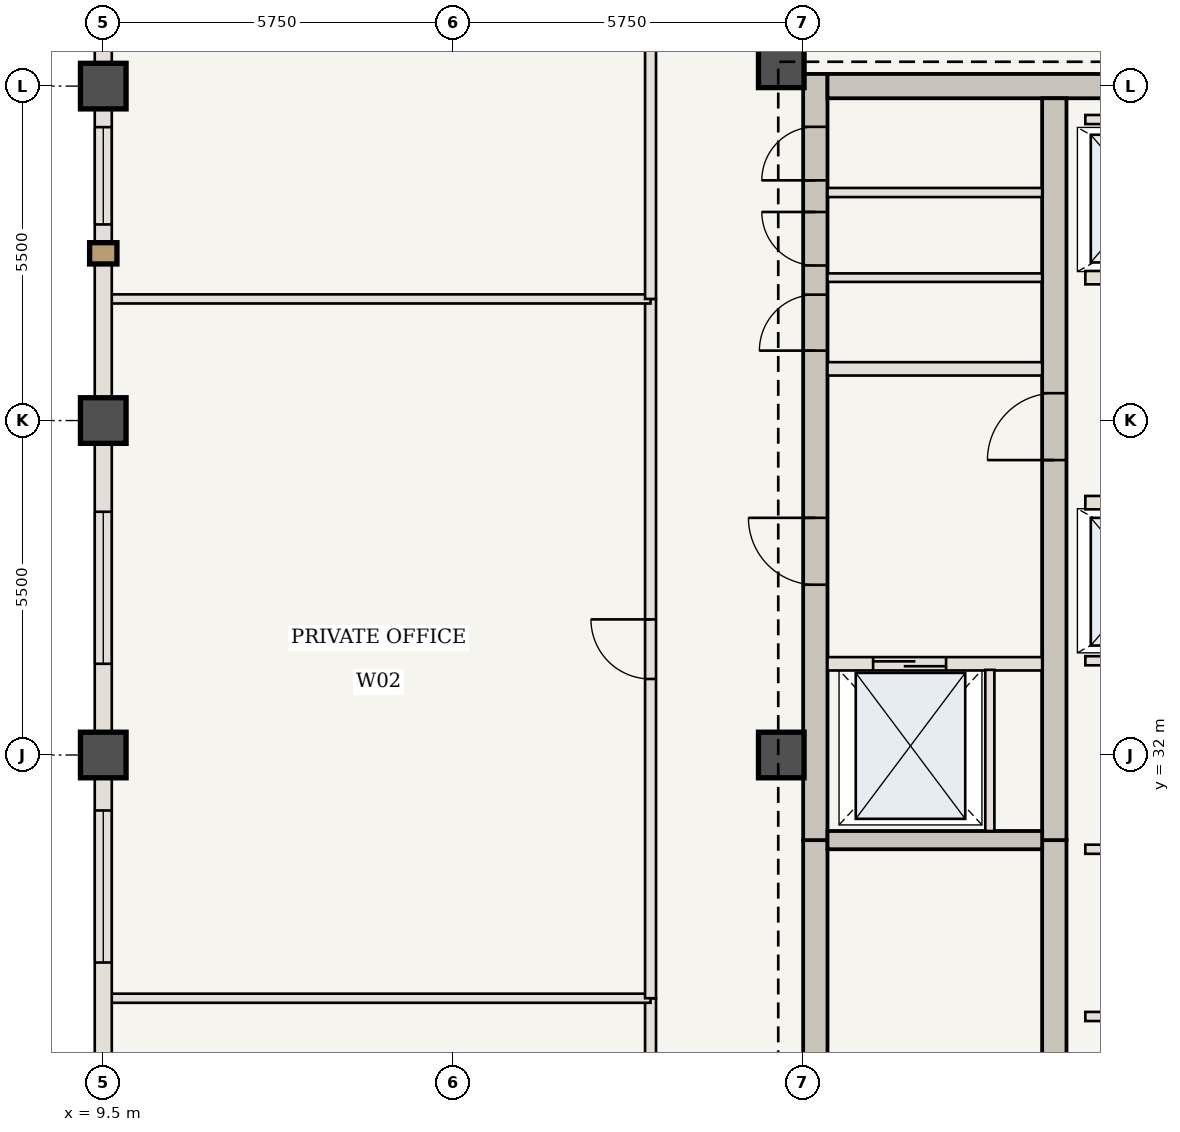
"""IFC4 building model, lengths in metres.
Left out: names, types, materials, properties, quantities, classifications, styles, units other than length and angle.
Written with IfcOpenShell. Run it as: python <this file> out.ifc"""

import sys

from ifc_helpers import new_model, si_unit, direction, frame, frame_2d, origin, origin_2d, place, context, subcontext, project, spatial, rectangle, extrude, element, fill, save


model = new_model("IFC4")
c1 = context("Model", 3, precision=1e-05, world=origin(), true_north=direction((0.0, 1.0)))
c2 = subcontext(c1, "Body", "Model", "MODEL_VIEW")
j1 = project(units=[si_unit("LENGTHUNIT", "METRE"), si_unit("PLANEANGLEUNIT", "RADIAN")], contexts=[c1])
p1 = place(None, origin())
s1 = spatial("IfcSite", under=j1, at=p1, CompositionType="ELEMENT")
p2 = place(p1, origin())
s2 = spatial("IfcBuilding", under=s1, at=p2, CompositionType="ELEMENT")
p3 = place(p2, frame((0.0, 0.0, 273.7)))
s3 = spatial("IfcBuildingStorey", under=s2, at=p3, CompositionType="ELEMENT", Elevation=273.7)
p4 = place(p3, frame((21.21, 20.75, 0.0), z_axis=(0.0, 0.0, 1.0), x_axis=(0.0, 1.0, 0.0)))
e1 = element("IfcWall", 1, at=p4, inside=s3, PredefinedType="SHEAR", context=c2, shape_type="SweptSolid", body=[
    extrude(rectangle(XDim=9.85, YDim=0.4, at=frame_2d((4.925, 0.0))), origin(), (0.0, 0.0, 1.0), 3.85),
])
p5 = place(p4, frame((1.0, 0.0, 0.0)))
e2 = element("IfcOpeningElement", 2, at=p5, cuts=e1, PredefinedType="OPENING", context=c2, shape_type="SweptSolid", body=[
    extrude(rectangle(XDim=1.15, YDim=2.15, at=frame_2d((0.575, 1.075))), frame((0.0, 0.21, 0.0), z_axis=(0.0, -1.0, 0.0), x_axis=(1.0, 0.0, 0.0)), (0.0, 0.0, 1.0), 0.42),
])
p6 = place(p3, frame((21.21, 30.6, 0.0), z_axis=(0.0, 0.0, 1.0), x_axis=(0.0, 1.0, 0.0)))
e3 = element("IfcWall", 3, at=p6, inside=s3, PredefinedType="SHEAR", context=c2, shape_type="SweptSolid", body=[
    extrude(rectangle(XDim=12.6, YDim=0.4, at=frame_2d((6.3, 0.0))), origin(), (0.0, 0.0, 1.0), 3.85),
])
p7 = place(p6, frame((4.2, 0.0, 0.0)))
e4 = element("IfcOpeningElement", 4, at=p7, cuts=e3, PredefinedType="OPENING", context=c2, shape_type="SweptSolid", body=[
    extrude(rectangle(XDim=1.1, YDim=2.15, at=frame_2d((0.55, 1.075))), frame((0.0, 0.21, 0.0), z_axis=(0.0, -1.0, 0.0), x_axis=(1.0, 0.0, 0.0)), (0.0, 0.0, 1.0), 0.42),
])
p8 = place(p6, frame((8.05, 0.0, 0.0)))
e5 = element("IfcOpeningElement", 5, at=p8, cuts=e3, PredefinedType="OPENING", context=c2, shape_type="SweptSolid", body=[
    extrude(rectangle(XDim=0.92, YDim=2.1, at=frame_2d((0.46, 1.05))), frame((0.0, 0.21, 0.0), z_axis=(0.0, -1.0, 0.0), x_axis=(1.0, 0.0, 0.0)), (0.0, 0.0, 1.0), 0.42),
])
p9 = place(p6, frame((9.45, 0.0, 0.0)))
e6 = element("IfcOpeningElement", 6, at=p9, cuts=e3, PredefinedType="OPENING", context=c2, shape_type="SweptSolid", body=[
    extrude(rectangle(XDim=0.88, YDim=2.1, at=frame_2d((0.44, 1.05))), frame((0.0, 0.21, 0.0), z_axis=(0.0, -1.0, 0.0), x_axis=(1.0, 0.0, 0.0)), (0.0, 0.0, 1.0), 0.42),
])
p10 = place(p6, frame((10.85, 0.0, 0.0)))
e7 = element("IfcOpeningElement", 7, at=p10, cuts=e3, PredefinedType="OPENING", context=c2, shape_type="SweptSolid", body=[
    extrude(rectangle(XDim=0.88, YDim=2.1, at=frame_2d((0.44, 1.05))), frame((0.0, 0.21, 0.0), z_axis=(0.0, -1.0, 0.0), x_axis=(1.0, 0.0, 0.0)), (0.0, 0.0, 1.0), 0.42),
])
p11 = place(p3, frame((21.41, 43.0, 0.0), z_axis=(0.0, 0.0, 1.0), x_axis=(1.0, 0.0, 0.0)))
e8 = element("IfcWall", 8, at=p11, inside=s3, PredefinedType="SHEAR", context=c2, shape_type="SweptSolid", body=[
    extrude(rectangle(XDim=12.79, YDim=0.4, at=frame_2d((6.395, 0.0))), origin(), (0.0, 0.0, 1.0), 3.85),
])
p12 = place(p3, frame((25.14, 21.15, 0.0), z_axis=(0.0, 0.0, 1.0), x_axis=(0.0, 1.0, 0.0)))
e9 = element("IfcWall", 9, at=p12, inside=s3, PredefinedType="SHEAR", context=c2, shape_type="SweptSolid", body=[
    extrude(rectangle(XDim=9.45, YDim=0.4, at=frame_2d((4.725, 0.0))), origin(), (0.0, 0.0, 1.0), 3.85),
])
p13 = place(p3, frame((25.14, 30.6, 0.0), z_axis=(0.0, 0.0, 1.0), x_axis=(0.0, 1.0, 0.0)))
e10 = element("IfcWall", 10, at=p13, inside=s3, PredefinedType="SHEAR", context=c2, shape_type="SweptSolid", body=[
    extrude(rectangle(XDim=12.2, YDim=0.4, at=frame_2d((6.1, 0.0))), origin(), (0.0, 0.0, 1.0), 3.85),
])
p14 = place(p13, frame((6.25, 0.0, 0.0)))
e11 = element("IfcOpeningElement", 11, at=p14, cuts=e10, PredefinedType="OPENING", context=c2, shape_type="SweptSolid", body=[
    extrude(rectangle(XDim=1.1, YDim=2.15, at=frame_2d((0.55, 1.075))), frame((0.0, 0.21, 0.0), z_axis=(0.0, -1.0, 0.0), x_axis=(1.0, 0.0, 0.0)), (0.0, 0.0, 1.0), 0.42),
])
for number, where, z_axis, x_axis in (
    (12, (20.65, 43.35, 0.0), (0.0, 0.0, 1.0), (1.0, 0.0, 0.0)),
    (13, (20.65, 32.0, 0.0), (0.0, 0.0, 1.0), (1.0, 0.0, 0.0)),
    (14, (9.5, 32.0, 0.0), (0.0, 0.0, 1.0), (1.0, 0.0, 0.0)),
    (15, (9.5, 37.5, 0.0), (0.0, 0.0, 1.0), (1.0, 0.0, 0.0)),
    (16, (9.5, 43.0, 0.0), (0.0, 0.0, 1.0), (1.0, 0.0, 0.0)),
):
    element("IfcColumn", number, at=place(p3, frame(where, z_axis=z_axis, x_axis=x_axis)), inside=s3, PredefinedType="COLUMN", context=c2, shape_type="SweptSolid", body=[
        extrude(rectangle(XDim=0.75, YDim=0.75, at=origin_2d()), origin(), (0.0, 0.0, 1.0), 3.85),
    ])
p15 = place(p3, frame((21.41, 30.6, 0.0), z_axis=(0.0, 0.0, 1.0), x_axis=(1.0, 0.0, 0.0)))
e17 = element("IfcWall", 17, at=p15, inside=s3, PredefinedType="SHEAR", context=c2, shape_type="SweptSolid", body=[
    extrude(rectangle(XDim=3.53, YDim=0.3, at=frame_2d((1.765, 0.0))), origin(), (0.0, 0.0, 1.0), 3.685),
])
p16 = place(p3, frame((21.41, 33.5, 0.0), z_axis=(0.0, 0.0, 1.0), x_axis=(1.0, 0.0, 0.0)))
e18 = element("IfcWall", 18, at=p16, inside=s3, PredefinedType="STANDARD", context=c2, shape_type="SweptSolid", body=[
    extrude(rectangle(XDim=3.53, YDim=0.22, at=frame_2d((1.765, 0.0))), origin(), (0.0, 0.0, 1.0), 3.685),
])
p17 = place(p16, frame((0.75, 0.0, 0.0)))
e19 = element("IfcOpeningElement", 19, at=p17, cuts=e18, PredefinedType="OPENING", context=c2, shape_type="SweptSolid", body=[
    extrude(rectangle(XDim=1.2, YDim=2.2, at=frame_2d((0.6, 1.1))), frame((0.0, 0.12, 0.0), z_axis=(0.0, -1.0, 0.0), x_axis=(1.0, 0.0, 0.0)), (0.0, 0.0, 1.0), 0.24),
])
p18 = place(p3, frame((24.08, 30.75, 0.0), z_axis=(0.0, 0.0, 1.0), x_axis=(0.0, 1.0, 0.0)))
e20 = element("IfcWall", 20, at=p18, inside=s3, PredefinedType="STANDARD", context=c2, shape_type="SweptSolid", body=[
    extrude(rectangle(XDim=2.65, YDim=0.15, at=frame_2d((1.325, 0.0))), origin(), (0.0, 0.0, 1.0), 3.685),
])
p19 = place(p3, frame((21.41, 38.35, 0.0), z_axis=(0.0, 0.0, 1.0), x_axis=(1.0, 0.0, 0.0)))
e21 = element("IfcWall", 21, at=p19, inside=s3, PredefinedType="STANDARD", context=c2, shape_type="SweptSolid", body=[
    extrude(rectangle(XDim=3.53, YDim=0.22, at=frame_2d((1.765, 0.0))), origin(), (0.0, 0.0, 1.0), 3.685),
])
p20 = place(p3, frame((21.41, 39.85, 0.0), z_axis=(0.0, 0.0, 1.0), x_axis=(1.0, 0.0, 0.0)))
e22 = element("IfcWall", 22, at=p20, inside=s3, PredefinedType="STANDARD", context=c2, shape_type="SweptSolid", body=[
    extrude(rectangle(XDim=3.53, YDim=0.14, at=frame_2d((1.765, 0.0))), origin(), (0.0, 0.0, 1.0), 3.685),
])
p21 = place(p3, frame((21.41, 41.25, 0.0), z_axis=(0.0, 0.0, 1.0), x_axis=(1.0, 0.0, 0.0)))
e23 = element("IfcWall", 23, at=p21, inside=s3, PredefinedType="STANDARD", context=c2, shape_type="SweptSolid", body=[
    extrude(rectangle(XDim=3.53, YDim=0.15, at=frame_2d((1.765, 0.0))), origin(), (0.0, 0.0, 1.0), 3.685),
])
p22 = place(p3, frame((25.65, 27.7, 0.0), z_axis=(0.0, 0.0, 1.0), x_axis=(1.0, 0.0, 0.0)))
e24 = element("IfcWall", 24, at=p22, inside=s3, PredefinedType="STANDARD", context=c2, shape_type="SweptSolid", body=[
    extrude(rectangle(XDim=9.35, YDim=0.15, at=frame_2d((4.675, 0.0))), origin(), (0.0, 0.0, 1.0), 3.685),
])
p23 = place(p22, frame((1.35, 0.0, 0.0)))
e25 = element("IfcOpeningElement", 25, at=p23, cuts=e24, PredefinedType="OPENING", context=c2, shape_type="SweptSolid", body=[
    extrude(rectangle(XDim=0.95, YDim=2.15, at=frame_2d((0.475, 1.075))), frame((0.0, 0.085, 0.0), z_axis=(0.0, -1.0, 0.0), x_axis=(1.0, 0.0, 0.0)), (0.0, 0.0, 1.0), 0.17),
])
p24 = place(p22, frame((4.7, 0.0, 0.0)))
e26 = element("IfcOpeningElement", 26, at=p24, cuts=e24, PredefinedType="OPENING", context=c2, shape_type="SweptSolid", body=[
    extrude(rectangle(XDim=0.98, YDim=2.2, at=frame_2d((0.49, 1.1))), frame((0.0, 0.085, 0.0), z_axis=(0.0, -1.0, 0.0), x_axis=(1.0, 0.0, 0.0)), (0.0, 0.0, 1.0), 0.17),
])
p25 = place(p3, frame((25.65, 30.45, 0.0), z_axis=(0.0, 0.0, 1.0), x_axis=(1.0, 0.0, 0.0)))
e27 = element("IfcWall", 27, at=p25, inside=s3, PredefinedType="STANDARD", context=c2, shape_type="SweptSolid", body=[
    extrude(rectangle(XDim=9.35, YDim=0.15, at=frame_2d((4.675, 0.0))), origin(), (0.0, 0.0, 1.0), 3.685),
])
p26 = place(p3, frame((25.65, 36.15, 0.0), z_axis=(0.0, 0.0, 1.0), x_axis=(1.0, 0.0, 0.0)))
e28 = element("IfcWall", 28, at=p26, inside=s3, PredefinedType="STANDARD", context=c2, shape_type="SweptSolid", body=[
    extrude(rectangle(XDim=4.3, YDim=0.22, at=frame_2d((2.15, 0.0))), origin(), (0.0, 0.0, 1.0), 3.685),
])
p27 = place(p26, frame((0.58, 0.0, 0.0)))
e29 = element("IfcOpeningElement", 29, at=p27, cuts=e28, PredefinedType="OPENING", context=c2, shape_type="SweptSolid", body=[
    extrude(rectangle(XDim=1.1, YDim=2.15, at=frame_2d((0.55, 1.075))), frame((0.0, 0.12, 0.0), z_axis=(0.0, -1.0, 0.0), x_axis=(1.0, 0.0, 0.0)), (0.0, 0.0, 1.0), 0.24),
])
p28 = place(p26, frame((2.55, 0.0, 0.0)))
e30 = element("IfcOpeningElement", 30, at=p28, cuts=e28, PredefinedType="OPENING", context=c2, shape_type="SweptSolid", body=[
    extrude(rectangle(XDim=1.1, YDim=2.15, at=frame_2d((0.55, 1.075))), frame((0.0, 0.12, 0.0), z_axis=(0.0, -1.0, 0.0), x_axis=(1.0, 0.0, 0.0)), (0.0, 0.0, 1.0), 0.24),
])
p29 = place(p3, frame((25.65, 33.55, 0.0), z_axis=(0.0, 0.0, 1.0), x_axis=(1.0, 0.0, 0.0)))
e31 = element("IfcWall", 31, at=p29, inside=s3, PredefinedType="STANDARD", context=c2, shape_type="SweptSolid", body=[
    extrude(rectangle(XDim=4.2, YDim=0.15, at=frame_2d((2.1, 0.0))), origin(), (0.0, 0.0, 1.0), 3.685),
])
p30 = place(p3, frame((25.65, 39.85, 0.0), z_axis=(0.0, 0.0, 1.0), x_axis=(1.0, 0.0, 0.0)))
e32 = element("IfcWall", 32, at=p30, inside=s3, PredefinedType="STANDARD", context=c2, shape_type="SweptSolid", body=[
    extrude(rectangle(XDim=4.3, YDim=0.22, at=frame_2d((2.15, 0.0))), origin(), (0.0, 0.0, 1.0), 3.685),
])
p31 = place(p30, frame((0.58, 0.0, 0.0)))
e33 = element("IfcOpeningElement", 33, at=p31, cuts=e32, PredefinedType="OPENING", context=c2, shape_type="SweptSolid", body=[
    extrude(rectangle(XDim=1.1, YDim=2.15, at=frame_2d((0.55, 1.075))), frame((0.0, 0.12, 0.0), z_axis=(0.0, -1.0, 0.0), x_axis=(1.0, 0.0, 0.0)), (0.0, 0.0, 1.0), 0.24),
])
p32 = place(p30, frame((2.55, 0.0, 0.0)))
e34 = element("IfcOpeningElement", 34, at=p32, cuts=e32, PredefinedType="OPENING", context=c2, shape_type="SweptSolid", body=[
    extrude(rectangle(XDim=1.1, YDim=2.15, at=frame_2d((0.55, 1.075))), frame((0.0, 0.12, 0.0), z_axis=(0.0, -1.0, 0.0), x_axis=(1.0, 0.0, 0.0)), (0.0, 0.0, 1.0), 0.24),
])
p33 = place(p3, frame((25.65, 42.45, 0.0), z_axis=(0.0, 0.0, 1.0), x_axis=(1.0, 0.0, 0.0)))
e35 = element("IfcWall", 35, at=p33, inside=s3, PredefinedType="STANDARD", context=c2, shape_type="SweptSolid", body=[
    extrude(rectangle(XDim=4.2, YDim=0.15, at=frame_2d((2.1, 0.0))), origin(), (0.0, 0.0, 1.0), 3.685),
])
p34 = place(p3, frame((18.5, 15.5, 0.0), z_axis=(0.0, 0.0, 1.0), x_axis=(0.0, 1.0, 0.0)))
e36 = element("IfcWall", 36, at=p34, inside=s3, PredefinedType="STANDARD", context=c2, shape_type="SweptSolid", body=[
    extrude(rectangle(XDim=12.5, YDim=0.18, at=frame_2d((6.25, 0.0))), origin(), (0.0, 0.0, 1.0), 3.685),
])
p35 = place(p34, frame((7.2, 0.0, 0.0)))
e37 = element("IfcOpeningElement", 37, at=p35, cuts=e36, PredefinedType="OPENING", context=c2, shape_type="SweptSolid", body=[
    extrude(rectangle(XDim=0.98, YDim=2.2, at=frame_2d((0.49, 1.1))), frame((0.0, 0.1, 0.0), z_axis=(0.0, -1.0, 0.0), x_axis=(1.0, 0.0, 0.0)), (0.0, 0.0, 1.0), 0.2),
])
p36 = place(p3, frame((9.56, 28.0, 0.0), z_axis=(0.0, 0.0, 1.0), x_axis=(1.0, 0.0, 0.0)))
e38 = element("IfcWall", 38, at=p36, inside=s3, PredefinedType="STANDARD", context=c2, shape_type="SweptSolid", body=[
    extrude(rectangle(XDim=8.94, YDim=0.15, at=frame_2d((4.47, 0.0))), origin(), (0.0, 0.0, 1.0), 3.685),
])
p37 = place(p3, frame((18.5, 28.0, 0.0), z_axis=(0.0, 0.0, 1.0), x_axis=(0.0, 1.0, 0.0)))
e39 = element("IfcWall", 39, at=p37, inside=s3, PredefinedType="STANDARD", context=c2, shape_type="SweptSolid", body=[
    extrude(rectangle(XDim=11.5, YDim=0.18, at=frame_2d((5.75, 0.0))), origin(), (0.0, 0.0, 1.0), 3.685),
])
p38 = place(p37, frame((5.25, 0.0, 0.0)))
e40 = element("IfcOpeningElement", 40, at=p38, cuts=e39, PredefinedType="OPENING", context=c2, shape_type="SweptSolid", body=[
    extrude(rectangle(XDim=0.98, YDim=2.2, at=frame_2d((0.49, 1.1))), frame((0.0, 0.1, 0.0), z_axis=(0.0, -1.0, 0.0), x_axis=(1.0, 0.0, 0.0)), (0.0, 0.0, 1.0), 0.2),
])
p39 = place(p3, frame((9.56, 39.5, 0.0), z_axis=(0.0, 0.0, 1.0), x_axis=(1.0, 0.0, 0.0)))
e41 = element("IfcWall", 41, at=p39, inside=s3, PredefinedType="STANDARD", context=c2, shape_type="SweptSolid", body=[
    extrude(rectangle(XDim=8.94, YDim=0.15, at=frame_2d((4.47, 0.0))), origin(), (0.0, 0.0, 1.0), 3.685),
])
p40 = place(p3, frame((18.5, 39.5, 0.0), z_axis=(0.0, 0.0, 1.0), x_axis=(0.0, 1.0, 0.0)))
e42 = element("IfcWall", 42, at=p40, inside=s3, PredefinedType="STANDARD", context=c2, shape_type="SweptSolid", body=[
    extrude(rectangle(XDim=9.0, YDim=0.18, at=frame_2d((4.5, 0.0))), origin(), (0.0, 0.0, 1.0), 3.685),
])
p41 = place(p40, frame((5.45, 0.0, 0.0)))
e43 = element("IfcOpeningElement", 43, at=p41, cuts=e42, PredefinedType="OPENING", context=c2, shape_type="SweptSolid", body=[
    extrude(rectangle(XDim=0.98, YDim=2.2, at=frame_2d((0.49, 1.1))), frame((0.0, 0.1, 0.0), z_axis=(0.0, -1.0, 0.0), x_axis=(1.0, 0.0, 0.0)), (0.0, 0.0, 1.0), 0.2),
])
p42 = place(p3, frame((9.5, 26.5, 0.0), z_axis=(0.0, 0.0, 1.0), x_axis=(0.0, 1.0, 0.0)))
e44 = element("IfcWall", 44, at=p42, inside=s3, PredefinedType="USERDEFINED", context=c2, shape_type="SweptSolid", body=[
    extrude(rectangle(XDim=5.5, YDim=0.28, at=frame_2d((2.75, 0.0))), origin(), (0.0, 0.0, 1.0), 2.985),
])
p43 = place(p42, frame((2.087, 0.0, 0.85)))
e45 = element("IfcOpeningElement", 45, at=p43, cuts=e44, PredefinedType="OPENING", context=c2, shape_type="SweptSolid", body=[
    extrude(rectangle(XDim=2.5, YDim=1.935, at=frame_2d((1.25, 0.968))), frame((0.0, 0.15, 0.0), z_axis=(0.0, -1.0, 0.0), x_axis=(1.0, 0.0, 0.0)), (0.0, 0.0, 1.0), 0.3),
])
p44 = place(p3, frame((9.5, 32.0, 0.0), z_axis=(0.0, 0.0, 1.0), x_axis=(0.0, 1.0, 0.0)))
e46 = element("IfcWall", 46, at=p44, inside=s3, PredefinedType="USERDEFINED", context=c2, shape_type="SweptSolid", body=[
    extrude(rectangle(XDim=5.5, YDim=0.28, at=frame_2d((2.75, 0.0))), origin(), (0.0, 0.0, 1.0), 2.985),
])
p45 = place(p44, frame((1.5, 0.0, 0.85)))
e47 = element("IfcOpeningElement", 47, at=p45, cuts=e46, PredefinedType="OPENING", context=c2, shape_type="SweptSolid", body=[
    extrude(rectangle(XDim=2.5, YDim=1.935, at=frame_2d((1.25, 0.968))), frame((0.0, 0.15, 0.0), z_axis=(0.0, -1.0, 0.0), x_axis=(1.0, 0.0, 0.0)), (0.0, 0.0, 1.0), 0.3),
])
p46 = place(p3, frame((9.5, 37.5, 0.0), z_axis=(0.0, 0.0, 1.0), x_axis=(0.0, 1.0, 0.0)))
e48 = element("IfcWall", 48, at=p46, inside=s3, PredefinedType="USERDEFINED", context=c2, shape_type="SweptSolid", body=[
    extrude(rectangle(XDim=5.5, YDim=0.28, at=frame_2d((2.75, 0.0))), origin(), (0.0, 0.0, 1.0), 2.985),
])
p47 = place(p46, frame((3.225, 0.0, 0.85)))
e49 = element("IfcOpeningElement", 49, at=p47, cuts=e48, PredefinedType="OPENING", context=c2, shape_type="SweptSolid", body=[
    extrude(rectangle(XDim=1.6, YDim=1.935, at=frame_2d((0.8, 0.968))), frame((0.0, 0.15, 0.0), z_axis=(0.0, -1.0, 0.0), x_axis=(1.0, 0.0, 0.0)), (0.0, 0.0, 1.0), 0.3),
])
p48 = place(p3, frame((9.5, 43.0, 0.0), z_axis=(0.0, 0.0, 1.0), x_axis=(0.0, 1.0, 0.0)))
e50 = element("IfcWall", 50, at=p48, inside=s3, PredefinedType="USERDEFINED", context=c2, shape_type="SweptSolid", body=[
    extrude(rectangle(XDim=5.5, YDim=0.28, at=frame_2d((2.75, 0.0))), origin(), (0.0, 0.0, 1.0), 2.985),
])
p49 = place(p7, origin())
e51 = element("IfcDoor", 51, at=p49, inside=s3, OperationType="SINGLE_SWING_RIGHT", PredefinedType="DOOR", context=c2, shape_type="SweptSolid", body=[
    extrude(rectangle(XDim=1.1, YDim=2.15, at=frame_2d((0.55, 1.075))), frame((0.0, 0.025, 0.0), z_axis=(0.0, -1.0, 0.0), x_axis=(1.0, 0.0, 0.0)), (0.0, 0.0, 1.0), 0.05),
])
fill(e4, e51)
p50 = place(p14, origin())
e52 = element("IfcDoor", 52, at=p50, inside=s3, OperationType="SINGLE_SWING_LEFT", PredefinedType="DOOR", context=c2, shape_type="SweptSolid", body=[
    extrude(rectangle(XDim=1.1, YDim=2.15, at=frame_2d((0.55, 1.075))), frame((0.0, 0.025, 0.0), z_axis=(0.0, -1.0, 0.0), x_axis=(1.0, 0.0, 0.0)), (0.0, 0.0, 1.0), 0.05),
])
fill(e11, e52)
p51 = place(p8, origin())
e53 = element("IfcDoor", 53, at=p51, inside=s3, OperationType="SINGLE_SWING_LEFT", PredefinedType="DOOR", context=c2, shape_type="SweptSolid", body=[
    extrude(rectangle(XDim=0.92, YDim=2.1, at=frame_2d((0.46, 1.05))), frame((0.0, 0.025, 0.0), z_axis=(0.0, -1.0, 0.0), x_axis=(1.0, 0.0, 0.0)), (0.0, 0.0, 1.0), 0.05),
])
fill(e5, e53)
p52 = place(p9, origin())
e54 = element("IfcDoor", 54, at=p52, inside=s3, OperationType="SINGLE_SWING_RIGHT", PredefinedType="DOOR", context=c2, shape_type="SweptSolid", body=[
    extrude(rectangle(XDim=0.88, YDim=2.1, at=frame_2d((0.44, 1.05))), frame((0.0, 0.025, 0.0), z_axis=(0.0, -1.0, 0.0), x_axis=(1.0, 0.0, 0.0)), (0.0, 0.0, 1.0), 0.05),
])
fill(e6, e54)
p53 = place(p10, origin())
e55 = element("IfcDoor", 55, at=p53, inside=s3, OperationType="SINGLE_SWING_LEFT", PredefinedType="DOOR", context=c2, shape_type="SweptSolid", body=[
    extrude(rectangle(XDim=0.88, YDim=2.1, at=frame_2d((0.44, 1.05))), frame((0.0, 0.025, 0.0), z_axis=(0.0, -1.0, 0.0), x_axis=(1.0, 0.0, 0.0)), (0.0, 0.0, 1.0), 0.05),
])
fill(e7, e55)
p54 = place(p17, origin())
e56 = element("IfcDoor", 56, at=p54, inside=s3, OperationType="DOUBLE_DOOR_SLIDING", PredefinedType="DOOR", context=c2, shape_type="SweptSolid", body=[
    extrude(rectangle(XDim=1.2, YDim=2.2, at=frame_2d((0.6, 1.1))), frame((0.0, 0.025, 0.0), z_axis=(0.0, -1.0, 0.0), x_axis=(1.0, 0.0, 0.0)), (0.0, 0.0, 1.0), 0.05),
])
fill(e19, e56)
p55 = place(p38, origin())
e57 = element("IfcDoor", 57, at=p55, inside=s3, OperationType="SINGLE_SWING_RIGHT", PredefinedType="DOOR", context=c2, shape_type="SweptSolid", body=[
    extrude(rectangle(XDim=0.98, YDim=2.2, at=frame_2d((0.49, 1.1))), frame((0.0, 0.025, 0.0), z_axis=(0.0, -1.0, 0.0), x_axis=(1.0, 0.0, 0.0)), (0.0, 0.0, 1.0), 0.05),
])
fill(e40, e57)
p56 = place(p43, origin())
e58 = element("IfcWindow", 58, at=p56, inside=s3, PartitioningType="SINGLE_PANEL", PredefinedType="WINDOW", context=c2, shape_type="SweptSolid", body=[
    extrude(rectangle(XDim=2.5, YDim=1.935, at=frame_2d((1.25, 0.968))), frame((0.0, 0.03, 0.0), z_axis=(0.0, -1.0, 0.0), x_axis=(1.0, 0.0, 0.0)), (0.0, 0.0, 1.0), 0.06),
])
fill(e45, e58)
p57 = place(p45, origin())
e59 = element("IfcWindow", 59, at=p57, inside=s3, PartitioningType="SINGLE_PANEL", PredefinedType="WINDOW", context=c2, shape_type="SweptSolid", body=[
    extrude(rectangle(XDim=2.5, YDim=1.935, at=frame_2d((1.25, 0.968))), frame((0.0, 0.03, 0.0), z_axis=(0.0, -1.0, 0.0), x_axis=(1.0, 0.0, 0.0)), (0.0, 0.0, 1.0), 0.06),
])
fill(e47, e59)
p58 = place(p47, origin())
e60 = element("IfcWindow", 60, at=p58, inside=s3, PartitioningType="SINGLE_PANEL", PredefinedType="WINDOW", context=c2, shape_type="SweptSolid", body=[
    extrude(rectangle(XDim=1.6, YDim=1.935, at=frame_2d((0.8, 0.968))), frame((0.0, 0.03, 0.0), z_axis=(0.0, -1.0, 0.0), x_axis=(1.0, 0.0, 0.0)), (0.0, 0.0, 1.0), 0.06),
])
fill(e49, e60)
save(model, sys.argv[1])
